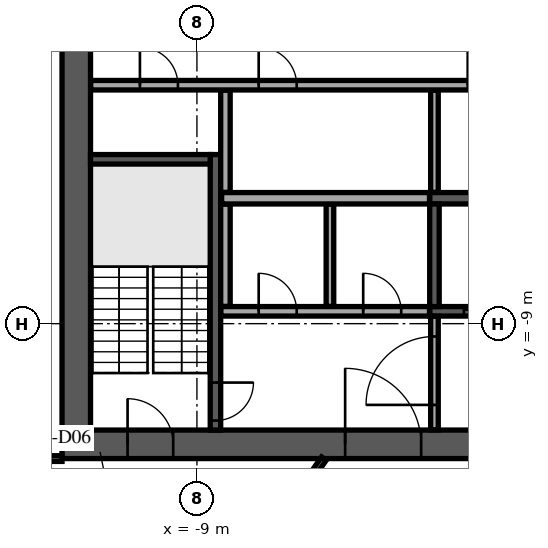
"""IFC4 building model, lengths in metres.
Left out: names, types, materials, properties, quantities, classifications, styles, units other than length and angle.
Written with IfcOpenShell. Run it as: python <this file> out.ifc"""

import sys

from ifc_helpers import new_model, si_unit, direction, frame, frame_2d, origin, place, context, subcontext, project, spatial, rectangle, extrude, element, fill, save


model = new_model("IFC4")
c1 = context("Model", 3, precision=1e-05, world=origin(), true_north=direction((0.0, 1.0)))
c2 = subcontext(c1, "Body", "Model", "MODEL_VIEW")
j1 = project(units=[si_unit("LENGTHUNIT", "METRE"), si_unit("PLANEANGLEUNIT", "RADIAN")], contexts=[c1])
p1 = place(None, origin())
s1 = spatial("IfcSite", under=j1, at=p1, CompositionType="ELEMENT")
p2 = place(p1, origin())
s2 = spatial("IfcBuilding", under=s1, at=p2, CompositionType="ELEMENT")
p3 = place(p2, frame((0.0, 0.0, 242.9)))
s3 = spatial("IfcBuildingStorey", under=s2, at=p3, CompositionType="ELEMENT", Elevation=242.9)
p4 = place(p3, frame((-12.55, -12.175, 0.0), z_axis=(0.0, 0.0, 1.0), x_axis=(1.0, 0.0, 0.0)))
e1 = element("IfcWall", 1, at=p4, inside=s3, PredefinedType="SHEAR", context=c2, shape_type="SweptSolid", body=[
    extrude(rectangle(XDim=25.1, YDim=0.75, at=frame_2d((12.55, 0.0))), origin(), (0.0, 0.0, 1.0), 3.64),
])
p5 = place(p4, frame((7.45, 0.0, 0.0)))
e2 = element("IfcOpeningElement", 2, at=p5, cuts=e1, PredefinedType="OPENING", context=c2, shape_type="SweptSolid", body=[
    extrude(rectangle(XDim=2.0, YDim=2.1, at=frame_2d((1.0, 1.05))), frame((0.0, 0.385, 0.0), z_axis=(0.0, -1.0, 0.0), x_axis=(1.0, 0.0, 0.0)), (0.0, 0.0, 1.0), 0.77),
])
p6 = place(p4, frame((17.575, 0.0, 0.0)))
e3 = element("IfcOpeningElement", 3, at=p6, cuts=e1, PredefinedType="OPENING", context=c2, shape_type="SweptSolid", body=[
    extrude(rectangle(XDim=1.2, YDim=2.1, at=frame_2d((0.6, 1.05))), frame((0.0, 0.385, 0.0), z_axis=(0.0, -1.0, 0.0), x_axis=(1.0, 0.0, 0.0)), (0.0, 0.0, 1.0), 0.77),
])
p7 = place(p4, frame((1.725, 0.0, 0.0)))
e4 = element("IfcOpeningElement", 4, at=p7, cuts=e1, PredefinedType="OPENING", context=c2, shape_type="SweptSolid", body=[
    extrude(rectangle(XDim=1.2, YDim=2.1, at=frame_2d((0.6, 1.05))), frame((0.0, 0.385, 0.0), z_axis=(0.0, -1.0, 0.0), x_axis=(1.0, 0.0, 0.0)), (0.0, 0.0, 1.0), 0.77),
])
p8 = place(p4, frame((22.175, 0.0, 0.0)))
e5 = element("IfcOpeningElement", 5, at=p8, cuts=e1, PredefinedType="OPENING", context=c2, shape_type="SweptSolid", body=[
    extrude(rectangle(XDim=1.2, YDim=2.1, at=frame_2d((0.6, 1.05))), frame((0.0, 0.385, 0.0), z_axis=(0.0, -1.0, 0.0), x_axis=(1.0, 0.0, 0.0)), (0.0, 0.0, 1.0), 0.77),
])
p9 = place(p3, frame((-12.175, -11.8, 0.0), z_axis=(0.0, 0.0, 1.0), x_axis=(0.0, 1.0, 0.0)))
e6 = element("IfcWall", 6, at=p9, inside=s3, PredefinedType="SHEAR", context=c2, shape_type="SweptSolid", body=[
    extrude(rectangle(XDim=23.6, YDim=0.75, at=frame_2d((11.8, 0.0))), origin(), (0.0, 0.0, 1.0), 3.64),
])
p10 = place(p9, frame((10.6, 0.0, 0.0)))
e7 = element("IfcOpeningElement", 7, at=p10, cuts=e6, PredefinedType="OPENING", context=c2, shape_type="SweptSolid", body=[
    extrude(rectangle(XDim=2.4, YDim=2.4, at=frame_2d((1.2, 1.2))), frame((0.0, 0.385, 0.0), z_axis=(0.0, -1.0, 0.0), x_axis=(1.0, 0.0, 0.0)), (0.0, 0.0, 1.0), 0.77),
])
p11 = place(p3, frame((-2.875, -5.7, 0.0), z_axis=(0.0, 0.0, 1.0), x_axis=(1.0, 0.0, 0.0)))
e8 = element("IfcWall", 8, at=p11, inside=s3, PredefinedType="SOLIDWALL", context=c2, shape_type="SweptSolid", body=[
    extrude(rectangle(XDim=11.25, YDim=0.3, at=frame_2d((5.625, 0.0))), origin(), (0.0, 0.0, 1.0), 3.64),
])
p12 = place(p3, frame((-2.875, -8.675, 0.0), z_axis=(0.0, 0.0, 1.0), x_axis=(1.0, 0.0, 0.0)))
e9 = element("IfcWall", 9, at=p12, inside=s3, PredefinedType="SOLIDWALL", context=c2, shape_type="SweptSolid", body=[
    extrude(rectangle(XDim=11.25, YDim=0.25, at=frame_2d((5.625, 0.0))), origin(), (0.0, 0.0, 1.0), 3.64),
])
p13 = place(p12, frame((0.9, 0.0, 0.0)))
e10 = element("IfcOpeningElement", 10, at=p13, cuts=e9, PredefinedType="OPENING", context=c2, shape_type="SweptSolid", body=[
    extrude(rectangle(XDim=1.2, YDim=2.1, at=frame_2d((0.6, 1.05))), frame((0.0, 0.135, 0.0), z_axis=(0.0, -1.0, 0.0), x_axis=(1.0, 0.0, 0.0)), (0.0, 0.0, 1.0), 0.27),
])
p14 = place(p12, frame((3.65, 0.0, 0.0)))
e11 = element("IfcOpeningElement", 11, at=p14, cuts=e9, PredefinedType="OPENING", context=c2, shape_type="SweptSolid", body=[
    extrude(rectangle(XDim=1.2, YDim=2.1, at=frame_2d((0.6, 1.05))), frame((0.0, 0.135, 0.0), z_axis=(0.0, -1.0, 0.0), x_axis=(1.0, 0.0, 0.0)), (0.0, 0.0, 1.0), 0.27),
])
p15 = place(p12, frame((6.4, 0.0, 0.0)))
e12 = element("IfcOpeningElement", 12, at=p15, cuts=e9, PredefinedType="OPENING", context=c2, shape_type="SweptSolid", body=[
    extrude(rectangle(XDim=1.2, YDim=2.1, at=frame_2d((0.6, 1.05))), frame((0.0, 0.135, 0.0), z_axis=(0.0, -1.0, 0.0), x_axis=(1.0, 0.0, 0.0)), (0.0, 0.0, 1.0), 0.27),
])
p16 = place(p12, frame((9.15, 0.0, 0.0)))
e13 = element("IfcOpeningElement", 13, at=p16, cuts=e9, PredefinedType="OPENING", context=c2, shape_type="SweptSolid", body=[
    extrude(rectangle(XDim=1.2, YDim=2.1, at=frame_2d((0.6, 1.05))), frame((0.0, 0.135, 0.0), z_axis=(0.0, -1.0, 0.0), x_axis=(1.0, 0.0, 0.0)), (0.0, 0.0, 1.0), 0.27),
])
p17 = place(p3, frame((-2.75, -8.55, 0.0), z_axis=(0.0, 0.0, 1.0), x_axis=(0.0, 1.0, 0.0)))
e14 = element("IfcWall", 14, at=p17, inside=s3, PredefinedType="SOLIDWALL", context=c2, shape_type="SweptSolid", body=[
    extrude(rectangle(XDim=2.7, YDim=0.25, at=frame_2d((1.35, 0.0))), origin(), (0.0, 0.0, 1.0), 3.64),
])
p18 = place(p3, frame((-8.512, -4.55, 0.0), z_axis=(0.0, 0.0, 1.0), x_axis=(0.0, -1.0, 0.0)))
e15 = element("IfcWall", 15, at=p18, inside=s3, PredefinedType="SOLIDWALL", context=c2, shape_type="SweptSolid", body=[
    extrude(rectangle(XDim=7.25, YDim=0.275, at=frame_2d((3.625, 0.0))), origin(), (0.0, 0.0, 1.0), 3.64),
])
p19 = place(p18, frame((6.0, 0.0, 0.0)))
e16 = element("IfcOpeningElement", 16, at=p19, cuts=e15, PredefinedType="OPENING", context=c2, shape_type="SweptSolid", body=[
    extrude(rectangle(XDim=1.0, YDim=2.1, at=frame_2d((0.5, 1.05))), frame((0.0, 0.147, 0.0), z_axis=(0.0, -1.0, 0.0), x_axis=(1.0, 0.0, 0.0)), (0.0, 0.0, 1.0), 0.295),
])
p20 = place(p3, frame((-8.65, -4.675, 0.0), z_axis=(0.0, 0.0, 1.0), x_axis=(-1.0, 0.0, 0.0)))
e17 = element("IfcWall", 17, at=p20, inside=s3, PredefinedType="SOLIDWALL", context=c2, shape_type="SweptSolid", body=[
    extrude(rectangle(XDim=3.15, YDim=0.25, at=frame_2d((1.575, 0.0))), origin(), (0.0, 0.0, 1.0), 3.64),
])
p21 = place(p3, frame((-2.75, -11.795, 0.0), z_axis=(0.0, 0.0, 1.0), x_axis=(0.0, 1.0, 0.0)))
e18 = element("IfcWall", 18, at=p21, inside=s3, PredefinedType="PARTITIONING", context=c2, shape_type="SweptSolid", body=[
    extrude(rectangle(XDim=2.99, YDim=0.2, at=frame_2d((1.495, 0.0))), origin(), (0.0, 0.0, 1.0), 3.64),
])
p22 = place(p21, frame((0.657, 0.0, 0.0)))
e19 = element("IfcOpeningElement", 19, at=p22, cuts=e18, PredefinedType="OPENING", context=c2, shape_type="SweptSolid", body=[
    extrude(rectangle(XDim=1.8, YDim=2.1, at=frame_2d((0.9, 1.05))), frame((0.0, 0.11, 0.0), z_axis=(0.0, -1.0, 0.0), x_axis=(1.0, 0.0, 0.0)), (0.0, 0.0, 1.0), 0.22),
])
p23 = place(p3, frame((-8.37, -8.675, 0.0), z_axis=(0.0, 0.0, 1.0), x_axis=(1.0, 0.0, 0.0)))
e20 = element("IfcWall", 20, at=p23, inside=s3, PredefinedType="PARTITIONING", context=c2, shape_type="SweptSolid", body=[
    extrude(rectangle(XDim=5.49, YDim=0.25, at=frame_2d((2.745, 0.0))), origin(), (0.0, 0.0, 1.0), 3.64),
])
p24 = place(p23, frame((0.995, 0.0, 0.0)))
e21 = element("IfcOpeningElement", 21, at=p24, cuts=e20, PredefinedType="OPENING", context=c2, shape_type="SweptSolid", body=[
    extrude(rectangle(XDim=1.0, YDim=2.1, at=frame_2d((0.5, 1.05))), frame((0.0, 0.135, 0.0), z_axis=(0.0, -1.0, 0.0), x_axis=(1.0, 0.0, 0.0)), (0.0, 0.0, 1.0), 0.27),
])
p25 = place(p23, frame((3.745, 0.0, 0.0)))
e22 = element("IfcOpeningElement", 22, at=p25, cuts=e20, PredefinedType="OPENING", context=c2, shape_type="SweptSolid", body=[
    extrude(rectangle(XDim=1.0, YDim=2.1, at=frame_2d((0.5, 1.05))), frame((0.0, 0.135, 0.0), z_axis=(0.0, -1.0, 0.0), x_axis=(1.0, 0.0, 0.0)), (0.0, 0.0, 1.0), 0.27),
])
p26 = place(p3, frame((-8.25, -8.545, 0.0), z_axis=(0.0, 0.0, 1.0), x_axis=(0.0, 1.0, 0.0)))
e23 = element("IfcWall", 23, at=p26, inside=s3, PredefinedType="PARTITIONING", context=c2, shape_type="SweptSolid", body=[
    extrude(rectangle(XDim=2.69, YDim=0.25, at=frame_2d((1.345, 0.0))), origin(), (0.0, 0.0, 1.0), 3.64),
])
p27 = place(p3, frame((-5.5, -8.545, 0.0), z_axis=(0.0, 0.0, 1.0), x_axis=(0.0, 1.0, 0.0)))
e24 = element("IfcWall", 24, at=p27, inside=s3, PredefinedType="PARTITIONING", context=c2, shape_type="SweptSolid", body=[
    extrude(rectangle(XDim=2.69, YDim=0.2, at=frame_2d((1.345, 0.0))), origin(), (0.0, 0.0, 1.0), 3.64),
])
p28 = place(p3, frame((-8.35, -5.7, 0.0), z_axis=(0.0, 0.0, 1.0), x_axis=(1.0, 0.0, 0.0)))
e25 = element("IfcWall", 25, at=p28, inside=s3, PredefinedType="PARTITIONING", context=c2, shape_type="SweptSolid", body=[
    extrude(rectangle(XDim=5.47, YDim=0.3, at=frame_2d((2.735, 0.0))), origin(), (0.0, 0.0, 1.0), 3.64),
])
p29 = place(p3, frame((-8.25, -5.545, 0.0), z_axis=(0.0, 0.0, 1.0), x_axis=(0.0, 1.0, 0.0)))
e26 = element("IfcWall", 26, at=p29, inside=s3, PredefinedType="PARTITIONING", context=c2, shape_type="SweptSolid", body=[
    extrude(rectangle(XDim=2.69, YDim=0.25, at=frame_2d((1.345, 0.0))), origin(), (0.0, 0.0, 1.0), 3.64),
])
p30 = place(p3, frame((-2.75, -5.545, 0.0), z_axis=(0.0, 0.0, 1.0), x_axis=(0.0, 1.0, 0.0)))
e27 = element("IfcWall", 27, at=p30, inside=s3, PredefinedType="PARTITIONING", context=c2, shape_type="SweptSolid", body=[
    extrude(rectangle(XDim=2.69, YDim=0.2, at=frame_2d((1.345, 0.0))), origin(), (0.0, 0.0, 1.0), 3.64),
])
p31 = place(p3, frame((-11.795, -2.725, 0.0), z_axis=(0.0, 0.0, 1.0), x_axis=(1.0, 0.0, 0.0)))
e28 = element("IfcWall", 28, at=p31, inside=s3, PredefinedType="PARTITIONING", context=c2, shape_type="SweptSolid", body=[
    extrude(rectangle(XDim=14.415, YDim=0.25, at=frame_2d((7.208, 0.0))), origin(), (0.0, 0.0, 1.0), 3.64),
])
p32 = place(p31, frame((1.295, 0.0, 0.0)))
e29 = element("IfcOpeningElement", 29, at=p32, cuts=e28, PredefinedType="OPENING", context=c2, shape_type="SweptSolid", body=[
    extrude(rectangle(XDim=1.0, YDim=2.1, at=frame_2d((0.5, 1.05))), frame((0.0, 0.135, 0.0), z_axis=(0.0, -1.0, 0.0), x_axis=(1.0, 0.0, 0.0)), (0.0, 0.0, 1.0), 0.27),
])
p33 = place(p31, frame((4.42, 0.0, 0.0)))
e30 = element("IfcOpeningElement", 30, at=p33, cuts=e28, PredefinedType="OPENING", context=c2, shape_type="SweptSolid", body=[
    extrude(rectangle(XDim=1.0, YDim=2.1, at=frame_2d((0.5, 1.05))), frame((0.0, 0.135, 0.0), z_axis=(0.0, -1.0, 0.0), x_axis=(1.0, 0.0, 0.0)), (0.0, 0.0, 1.0), 0.27),
])
p34 = place(p31, frame((9.92, 0.0, 0.0)))
e31 = element("IfcOpeningElement", 31, at=p34, cuts=e28, PredefinedType="OPENING", context=c2, shape_type="SweptSolid", body=[
    extrude(rectangle(XDim=1.0, YDim=2.1, at=frame_2d((0.5, 1.05))), frame((0.0, 0.135, 0.0), z_axis=(0.0, -1.0, 0.0), x_axis=(1.0, 0.0, 0.0)), (0.0, 0.0, 1.0), 0.27),
])
p35 = place(p3, frame((-5.115, 33.491, 0.0), z_axis=(0.0, 0.0, 1.0), x_axis=(-0.57357740375, -0.819151366908, 0.0)))
e32 = element("IfcWall", 32, at=p35, inside=s3, PredefinedType="STANDARD", context=c2, shape_type="SweptSolid", body=[
    extrude(rectangle(XDim=48.843, YDim=0.6, at=frame_2d((24.422, 0.0))), origin(), (0.0, 0.0, 1.0), 3.64),
])
p36 = place(p35, frame((1.22, 0.0, 0.9)))
e33 = element("IfcOpeningElement", 33, at=p36, cuts=e32, PredefinedType="OPENING", context=c2, shape_type="SweptSolid", body=[
    extrude(rectangle(XDim=2.0, YDim=2.1, at=frame_2d((1.0, 1.05))), frame((0.0, 0.31, 0.0), z_axis=(0.0, -1.0, 0.0), x_axis=(1.0, 0.0, 0.0)), (0.0, 0.0, 1.0), 0.62),
])
p37 = place(p35, frame((5.66, 0.0, 0.9)))
e34 = element("IfcOpeningElement", 34, at=p37, cuts=e32, PredefinedType="OPENING", context=c2, shape_type="SweptSolid", body=[
    extrude(rectangle(XDim=2.0, YDim=2.1, at=frame_2d((1.0, 1.05))), frame((0.0, 0.31, 0.0), z_axis=(0.0, -1.0, 0.0), x_axis=(1.0, 0.0, 0.0)), (0.0, 0.0, 1.0), 0.62),
])
p38 = place(p35, frame((10.101, 0.0, 0.9)))
e35 = element("IfcOpeningElement", 35, at=p38, cuts=e32, PredefinedType="OPENING", context=c2, shape_type="SweptSolid", body=[
    extrude(rectangle(XDim=2.0, YDim=2.1, at=frame_2d((1.0, 1.05))), frame((0.0, 0.31, 0.0), z_axis=(0.0, -1.0, 0.0), x_axis=(1.0, 0.0, 0.0)), (0.0, 0.0, 1.0), 0.62),
])
p39 = place(p35, frame((14.541, 0.0, 0.9)))
e36 = element("IfcOpeningElement", 36, at=p39, cuts=e32, PredefinedType="OPENING", context=c2, shape_type="SweptSolid", body=[
    extrude(rectangle(XDim=2.0, YDim=2.1, at=frame_2d((1.0, 1.05))), frame((0.0, 0.31, 0.0), z_axis=(0.0, -1.0, 0.0), x_axis=(1.0, 0.0, 0.0)), (0.0, 0.0, 1.0), 0.62),
])
p40 = place(p35, frame((18.981, 0.0, 0.9)))
e37 = element("IfcOpeningElement", 37, at=p40, cuts=e32, PredefinedType="OPENING", context=c2, shape_type="SweptSolid", body=[
    extrude(rectangle(XDim=2.0, YDim=2.1, at=frame_2d((1.0, 1.05))), frame((0.0, 0.31, 0.0), z_axis=(0.0, -1.0, 0.0), x_axis=(1.0, 0.0, 0.0)), (0.0, 0.0, 1.0), 0.62),
])
p41 = place(p35, frame((23.422, 0.0, 0.9)))
e38 = element("IfcOpeningElement", 38, at=p41, cuts=e32, PredefinedType="OPENING", context=c2, shape_type="SweptSolid", body=[
    extrude(rectangle(XDim=2.0, YDim=2.1, at=frame_2d((1.0, 1.05))), frame((0.0, 0.31, 0.0), z_axis=(0.0, -1.0, 0.0), x_axis=(1.0, 0.0, 0.0)), (0.0, 0.0, 1.0), 0.62),
])
p42 = place(p35, frame((27.862, 0.0, 0.9)))
e39 = element("IfcOpeningElement", 39, at=p42, cuts=e32, PredefinedType="OPENING", context=c2, shape_type="SweptSolid", body=[
    extrude(rectangle(XDim=2.0, YDim=2.1, at=frame_2d((1.0, 1.05))), frame((0.0, 0.31, 0.0), z_axis=(0.0, -1.0, 0.0), x_axis=(1.0, 0.0, 0.0)), (0.0, 0.0, 1.0), 0.62),
])
p43 = place(p35, frame((32.302, 0.0, 0.9)))
e40 = element("IfcOpeningElement", 40, at=p43, cuts=e32, PredefinedType="OPENING", context=c2, shape_type="SweptSolid", body=[
    extrude(rectangle(XDim=2.0, YDim=2.1, at=frame_2d((1.0, 1.05))), frame((0.0, 0.31, 0.0), z_axis=(0.0, -1.0, 0.0), x_axis=(1.0, 0.0, 0.0)), (0.0, 0.0, 1.0), 0.62),
])
p44 = place(p35, frame((36.742, 0.0, 0.9)))
e41 = element("IfcOpeningElement", 41, at=p44, cuts=e32, PredefinedType="OPENING", context=c2, shape_type="SweptSolid", body=[
    extrude(rectangle(XDim=2.0, YDim=2.1, at=frame_2d((1.0, 1.05))), frame((0.0, 0.31, 0.0), z_axis=(0.0, -1.0, 0.0), x_axis=(1.0, 0.0, 0.0)), (0.0, 0.0, 1.0), 0.62),
])
p45 = place(p35, frame((41.183, 0.0, 0.9)))
e42 = element("IfcOpeningElement", 42, at=p45, cuts=e32, PredefinedType="OPENING", context=c2, shape_type="SweptSolid", body=[
    extrude(rectangle(XDim=2.0, YDim=2.1, at=frame_2d((1.0, 1.05))), frame((0.0, 0.31, 0.0), z_axis=(0.0, -1.0, 0.0), x_axis=(1.0, 0.0, 0.0)), (0.0, 0.0, 1.0), 0.62),
])
p46 = place(p35, frame((45.623, 0.0, 0.9)))
e43 = element("IfcOpeningElement", 43, at=p46, cuts=e32, PredefinedType="OPENING", context=c2, shape_type="SweptSolid", body=[
    extrude(rectangle(XDim=2.0, YDim=2.1, at=frame_2d((1.0, 1.05))), frame((0.0, 0.31, 0.0), z_axis=(0.0, -1.0, 0.0), x_axis=(1.0, 0.0, 0.0)), (0.0, 0.0, 1.0), 0.62),
])
p47 = place(p3, frame((-26.231, -7.537, 0.0), z_axis=(0.0, 0.0, 1.0), x_axis=(0.819166569978, -0.573555690959, 0.0)))
e44 = element("IfcWall", 44, at=p47, inside=s3, PredefinedType="PARTITIONING", context=c2, shape_type="SweptSolid", body=[
    extrude(rectangle(XDim=34.403, YDim=0.15, at=frame_2d((17.201, 0.0))), origin(), (0.0, 0.0, 1.0), 3.24),
])
p48 = place(p47, frame((3.05, 0.0, 0.0)))
e45 = element("IfcOpeningElement", 45, at=p48, cuts=e44, PredefinedType="OPENING", context=c2, shape_type="SweptSolid", body=[
    extrude(rectangle(XDim=1.8, YDim=2.1, at=frame_2d((0.9, 1.05))), frame((0.0, 0.085, 0.0), z_axis=(0.0, -1.0, 0.0), x_axis=(1.0, 0.0, 0.0)), (0.0, 0.0, 1.0), 0.17),
])
p49 = place(p47, frame((13.103, 0.0, 0.0)))
e46 = element("IfcOpeningElement", 46, at=p49, cuts=e44, PredefinedType="OPENING", context=c2, shape_type="SweptSolid", body=[
    extrude(rectangle(XDim=1.0, YDim=2.1, at=frame_2d((0.5, 1.05))), frame((0.0, 0.085, 0.0), z_axis=(0.0, -1.0, 0.0), x_axis=(1.0, 0.0, 0.0)), (0.0, 0.0, 1.0), 0.17),
])
p50 = place(p47, frame((19.173, 0.0, 0.0)))
e47 = element("IfcOpeningElement", 47, at=p50, cuts=e44, PredefinedType="OPENING", context=c2, shape_type="SweptSolid", body=[
    extrude(rectangle(XDim=1.0, YDim=2.1, at=frame_2d((0.5, 1.05))), frame((0.0, 0.085, 0.0), z_axis=(0.0, -1.0, 0.0), x_axis=(1.0, 0.0, 0.0)), (0.0, 0.0, 1.0), 0.17),
])
p51 = place(p3, frame((-14.886, -12.55, 0.0), z_axis=(0.0, 0.0, 1.0), x_axis=(0.819131763787, -0.57360539882, 0.0)))
e48 = element("IfcWall", 48, at=p51, inside=s3, PredefinedType="PARTITIONING", context=c2, shape_type="SweptSolid", body=[
    extrude(rectangle(XDim=7.559, YDim=0.15, at=frame_2d((3.78, 0.0))), origin(), (0.0, 0.0, 1.0), 3.24),
])
p52 = place(p51, frame((4.3, 0.0, 0.0)))
e49 = element("IfcOpeningElement", 49, at=p52, cuts=e48, PredefinedType="OPENING", context=c2, shape_type="SweptSolid", body=[
    extrude(rectangle(XDim=1.0, YDim=2.1, at=frame_2d((0.5, 1.05))), frame((0.0, 0.085, 0.0), z_axis=(0.0, -1.0, 0.0), x_axis=(1.0, 0.0, 0.0)), (0.0, 0.0, 1.0), 0.17),
])
p53 = place(p3, frame((-14.648, -12.55, 0.0), z_axis=(0.0, 0.0, 1.0), x_axis=(1.0, 0.0, 0.0)))
e50 = element("IfcWall", 50, at=p53, inside=s3, PredefinedType="PARTITIONING", context=c2, shape_type="SweptSolid", body=[
    extrude(rectangle(XDim=2.098, YDim=0.15, at=frame_2d((1.049, 0.0))), origin(), (0.0, 0.0, 1.0), 3.24),
])
p54 = place(p3, frame((-8.651, -16.825, 0.0), z_axis=(0.0, 0.0, 1.0), x_axis=(0.57354712093, 0.819172570386, 0.0)))
e51 = element("IfcWall", 51, at=p54, inside=s3, PredefinedType="PARTITIONING", context=c2, shape_type="SweptSolid", body=[
    extrude(rectangle(XDim=5.218, YDim=0.15, at=frame_2d((2.609, 0.0))), origin(), (0.0, 0.0, 1.0), 3.24),
])
p55 = place(p5, origin())
e52 = element("IfcDoor", 52, at=p55, inside=s3, OperationType="SINGLE_SWING_LEFT", PredefinedType="DOOR", context=c2, shape_type="SweptSolid", body=[
    extrude(rectangle(XDim=2.0, YDim=2.1, at=frame_2d((1.0, 1.05))), frame((0.0, 0.025, 0.0), z_axis=(0.0, -1.0, 0.0), x_axis=(1.0, 0.0, 0.0)), (0.0, 0.0, 1.0), 0.05),
])
fill(e2, e52)
p56 = place(p7, origin())
e53 = element("IfcDoor", 53, at=p56, inside=s3, OperationType="SINGLE_SWING_LEFT", PredefinedType="DOOR", context=c2, shape_type="SweptSolid", body=[
    extrude(rectangle(XDim=1.2, YDim=2.1, at=frame_2d((0.6, 1.05))), frame((0.0, 0.025, 0.0), z_axis=(0.0, -1.0, 0.0), x_axis=(1.0, 0.0, 0.0)), (0.0, 0.0, 1.0), 0.05),
])
fill(e4, e53)
p57 = place(p13, origin())
e54 = element("IfcDoor", 54, at=p57, inside=s3, OperationType="DOUBLE_DOOR_SLIDING", PredefinedType="DOOR", context=c2, shape_type="SweptSolid", body=[
    extrude(rectangle(XDim=1.2, YDim=2.1, at=frame_2d((0.6, 1.05))), frame((0.0, 0.025, 0.0), z_axis=(0.0, -1.0, 0.0), x_axis=(1.0, 0.0, 0.0)), (0.0, 0.0, 1.0), 0.05),
])
fill(e10, e54)
p58 = place(p19, origin())
e55 = element("IfcDoor", 55, at=p58, inside=s3, OperationType="SINGLE_SWING_LEFT", PredefinedType="DOOR", context=c2, shape_type="SweptSolid", body=[
    extrude(rectangle(XDim=1.0, YDim=2.1, at=frame_2d((0.5, 1.05))), frame((0.0, 0.025, 0.0), z_axis=(0.0, -1.0, 0.0), x_axis=(1.0, 0.0, 0.0)), (0.0, 0.0, 1.0), 0.05),
])
fill(e16, e55)
p59 = place(p24, origin())
e56 = element("IfcDoor", 56, at=p59, inside=s3, OperationType="SINGLE_SWING_RIGHT", PredefinedType="DOOR", context=c2, shape_type="SweptSolid", body=[
    extrude(rectangle(XDim=1.0, YDim=2.1, at=frame_2d((0.5, 1.05))), frame((0.0, 0.025, 0.0), z_axis=(0.0, -1.0, 0.0), x_axis=(1.0, 0.0, 0.0)), (0.0, 0.0, 1.0), 0.05),
])
fill(e21, e56)
p60 = place(p25, origin())
e57 = element("IfcDoor", 57, at=p60, inside=s3, OperationType="SINGLE_SWING_RIGHT", PredefinedType="DOOR", context=c2, shape_type="SweptSolid", body=[
    extrude(rectangle(XDim=1.0, YDim=2.1, at=frame_2d((0.5, 1.05))), frame((0.0, 0.025, 0.0), z_axis=(0.0, -1.0, 0.0), x_axis=(1.0, 0.0, 0.0)), (0.0, 0.0, 1.0), 0.05),
])
fill(e22, e57)
p61 = place(p32, origin())
e58 = element("IfcDoor", 58, at=p61, inside=s3, OperationType="SINGLE_SWING_RIGHT", PredefinedType="DOOR", context=c2, shape_type="SweptSolid", body=[
    extrude(rectangle(XDim=1.0, YDim=2.1, at=frame_2d((0.5, 1.05))), frame((0.0, 0.025, 0.0), z_axis=(0.0, -1.0, 0.0), x_axis=(1.0, 0.0, 0.0)), (0.0, 0.0, 1.0), 0.05),
])
fill(e29, e58)
p62 = place(p33, origin())
e59 = element("IfcDoor", 59, at=p62, inside=s3, OperationType="SINGLE_SWING_RIGHT", PredefinedType="DOOR", context=c2, shape_type="SweptSolid", body=[
    extrude(rectangle(XDim=1.0, YDim=2.1, at=frame_2d((0.5, 1.05))), frame((0.0, 0.025, 0.0), z_axis=(0.0, -1.0, 0.0), x_axis=(1.0, 0.0, 0.0)), (0.0, 0.0, 1.0), 0.05),
])
fill(e30, e59)
p63 = place(p34, origin())
e60 = element("IfcDoor", 60, at=p63, inside=s3, OperationType="SINGLE_SWING_RIGHT", PredefinedType="DOOR", context=c2, shape_type="SweptSolid", body=[
    extrude(rectangle(XDim=1.0, YDim=2.1, at=frame_2d((0.5, 1.05))), frame((0.0, 0.025, 0.0), z_axis=(0.0, -1.0, 0.0), x_axis=(1.0, 0.0, 0.0)), (0.0, 0.0, 1.0), 0.05),
])
fill(e31, e60)
p64 = place(p22, origin())
e61 = element("IfcDoor", 61, at=p64, inside=s3, OperationType="SINGLE_SWING_LEFT", PredefinedType="DOOR", context=c2, shape_type="SweptSolid", body=[
    extrude(rectangle(XDim=1.8, YDim=2.1, at=frame_2d((0.9, 1.05))), frame((0.0, 0.025, 0.0), z_axis=(0.0, -1.0, 0.0), x_axis=(1.0, 0.0, 0.0)), (0.0, 0.0, 1.0), 0.05),
])
fill(e19, e61)
save(model, sys.argv[1])
